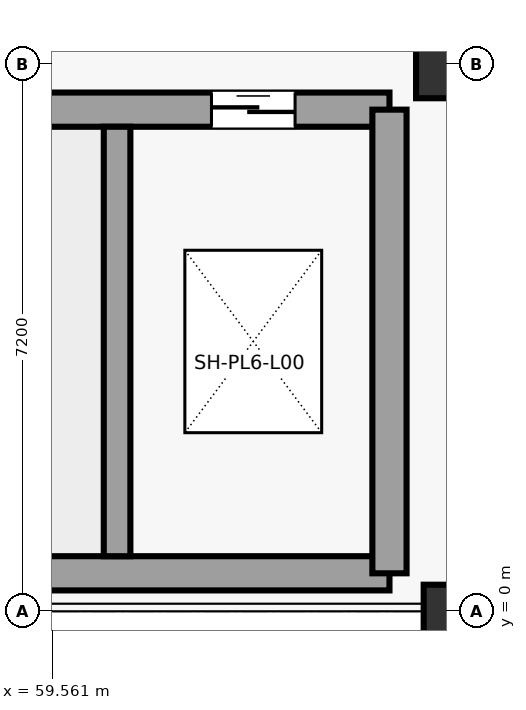
"""IFC4 building model, lengths in metres.
Left out: names, types, materials, properties, quantities, classifications, styles, units other than length and angle.
Written with IfcOpenShell. Run it as: python <this file> out.ifc"""

import sys

from ifc_helpers import new_model, si_unit, direction, frame, frame_2d, origin, origin_2d, place, context, subcontext, project, spatial, rectangle, extrude, element, fill, save


model = new_model("IFC4")
c1 = context("Model", 3, precision=1e-05, world=origin(), true_north=direction((0.0, 1.0)))
c2 = subcontext(c1, "Body", "Model", "MODEL_VIEW")
j1 = project(units=[si_unit("LENGTHUNIT", "METRE"), si_unit("PLANEANGLEUNIT", "RADIAN")], contexts=[c1])
p1 = place(None, origin())
s1 = spatial("IfcSite", under=j1, at=p1, CompositionType="ELEMENT")
p2 = place(p1, origin())
s2 = spatial("IfcBuilding", under=s1, at=p2, CompositionType="ELEMENT")
p3 = place(p2, origin())
s3 = spatial("IfcBuildingStorey", under=s2, at=p3, CompositionType="ELEMENT", Elevation=0.0)
p4 = place(p3, frame((64.8, 0.0, 0.0), z_axis=(0.0, 0.0, 1.0), x_axis=(1.0, 0.0, 0.0)))
e1 = element("IfcColumn", 1, at=p4, inside=s3, PredefinedType="COLUMN", context=c2, shape_type="SweptSolid", body=[
    extrude(rectangle(XDim=0.7, YDim=0.7, at=origin_2d()), origin(), (0.0, 0.0, 1.0), 5.4),
])
p5 = place(p3, frame((64.8, 7.2, 0.0), z_axis=(0.0, 0.0, 1.0), x_axis=(1.0, 0.0, 0.0)))
e2 = element("IfcColumn", 2, at=p5, inside=s3, PredefinedType="COLUMN", context=c2, shape_type="SweptSolid", body=[
    extrude(rectangle(XDim=0.9, YDim=0.9, at=origin_2d()), origin(), (0.0, 0.0, 1.0), 5.4),
])
p6 = place(p3, frame((51.2, 0.5, 0.0), z_axis=(0.0, 0.0, 1.0), x_axis=(1.0, 0.0, 0.0)))
e3 = element("IfcWall", 3, at=p6, inside=s3, PredefinedType="SHEAR", context=c2, shape_type="SweptSolid", body=[
    extrude(rectangle(XDim=12.8, YDim=0.45, at=frame_2d((6.4, 0.0))), origin(), (0.0, 0.0, 1.0), 5.06),
])
p7 = place(p6, frame((0.55, 0.0, 0.0)))
e4 = element("IfcOpeningElement", 4, at=p7, cuts=e3, PredefinedType="OPENING", context=c2, shape_type="SweptSolid", body=[
    extrude(rectangle(XDim=1.5, YDim=2.25, at=frame_2d((0.75, 1.125))), frame((0.0, 0.235, 0.0), z_axis=(0.0, -1.0, 0.0), x_axis=(1.0, 0.0, 0.0)), (0.0, 0.0, 1.0), 0.47),
])
p8 = place(p3, frame((51.2, 6.6, 0.0), z_axis=(0.0, 0.0, 1.0), x_axis=(1.0, 0.0, 0.0)))
e5 = element("IfcWall", 5, at=p8, inside=s3, PredefinedType="SHEAR", context=c2, shape_type="SweptSolid", body=[
    extrude(rectangle(XDim=12.8, YDim=0.45, at=frame_2d((6.4, 0.0))), origin(), (0.0, 0.0, 1.0), 5.06),
])
p9 = place(p8, frame((0.55, 0.0, 0.0)))
e6 = element("IfcOpeningElement", 6, at=p9, cuts=e5, PredefinedType="OPENING", context=c2, shape_type="SweptSolid", body=[
    extrude(rectangle(XDim=1.2, YDim=2.25, at=frame_2d((0.6, 1.125))), frame((0.0, 0.235, 0.0), z_axis=(0.0, -1.0, 0.0), x_axis=(1.0, 0.0, 0.0)), (0.0, 0.0, 1.0), 0.47),
])
p10 = place(p8, frame((10.458, 0.0, 0.0)))
e7 = element("IfcOpeningElement", 7, at=p10, cuts=e5, PredefinedType="OPENING", context=c2, shape_type="SweptSolid", body=[
    extrude(rectangle(XDim=1.1, YDim=2.2, at=frame_2d((0.55, 1.1))), frame((0.0, 0.235, 0.0), z_axis=(0.0, -1.0, 0.0), x_axis=(1.0, 0.0, 0.0)), (0.0, 0.0, 1.0), 0.47),
])
p11 = place(p3, frame((64.0, 0.5, 0.0), z_axis=(0.0, 0.0, 1.0), x_axis=(0.0, 1.0, 0.0)))
e8 = element("IfcWall", 8, at=p11, inside=s3, PredefinedType="SHEAR", context=c2, shape_type="SweptSolid", body=[
    extrude(rectangle(XDim=6.1, YDim=0.45, at=frame_2d((3.05, 0.0))), origin(), (0.0, 0.0, 1.0), 5.06),
])
p12 = place(p3, frame((60.416, 0.725, 0.0), z_axis=(0.0, 0.0, 1.0), x_axis=(0.0, 1.0, 0.0)))
e9 = element("IfcWall", 9, at=p12, inside=s3, PredefinedType="SHEAR", context=c2, shape_type="SweptSolid", body=[
    extrude(rectangle(XDim=5.65, YDim=0.35, at=frame_2d((2.825, 0.0))), origin(), (0.0, 0.0, 1.0), 5.06),
])
p13 = place(p10, origin())
e10 = element("IfcDoor", 10, at=p13, inside=s3, OperationType="SLIDING_TO_LEFT", PredefinedType="DOOR", context=c2, shape_type="SweptSolid", body=[
    extrude(rectangle(XDim=1.1, YDim=2.2, at=frame_2d((0.55, 1.1))), frame((0.0, 0.025, 0.0), z_axis=(0.0, -1.0, 0.0), x_axis=(1.0, 0.0, 0.0)), (0.0, 0.0, 1.0), 0.05),
])
fill(e7, e10)
save(model, sys.argv[1])
